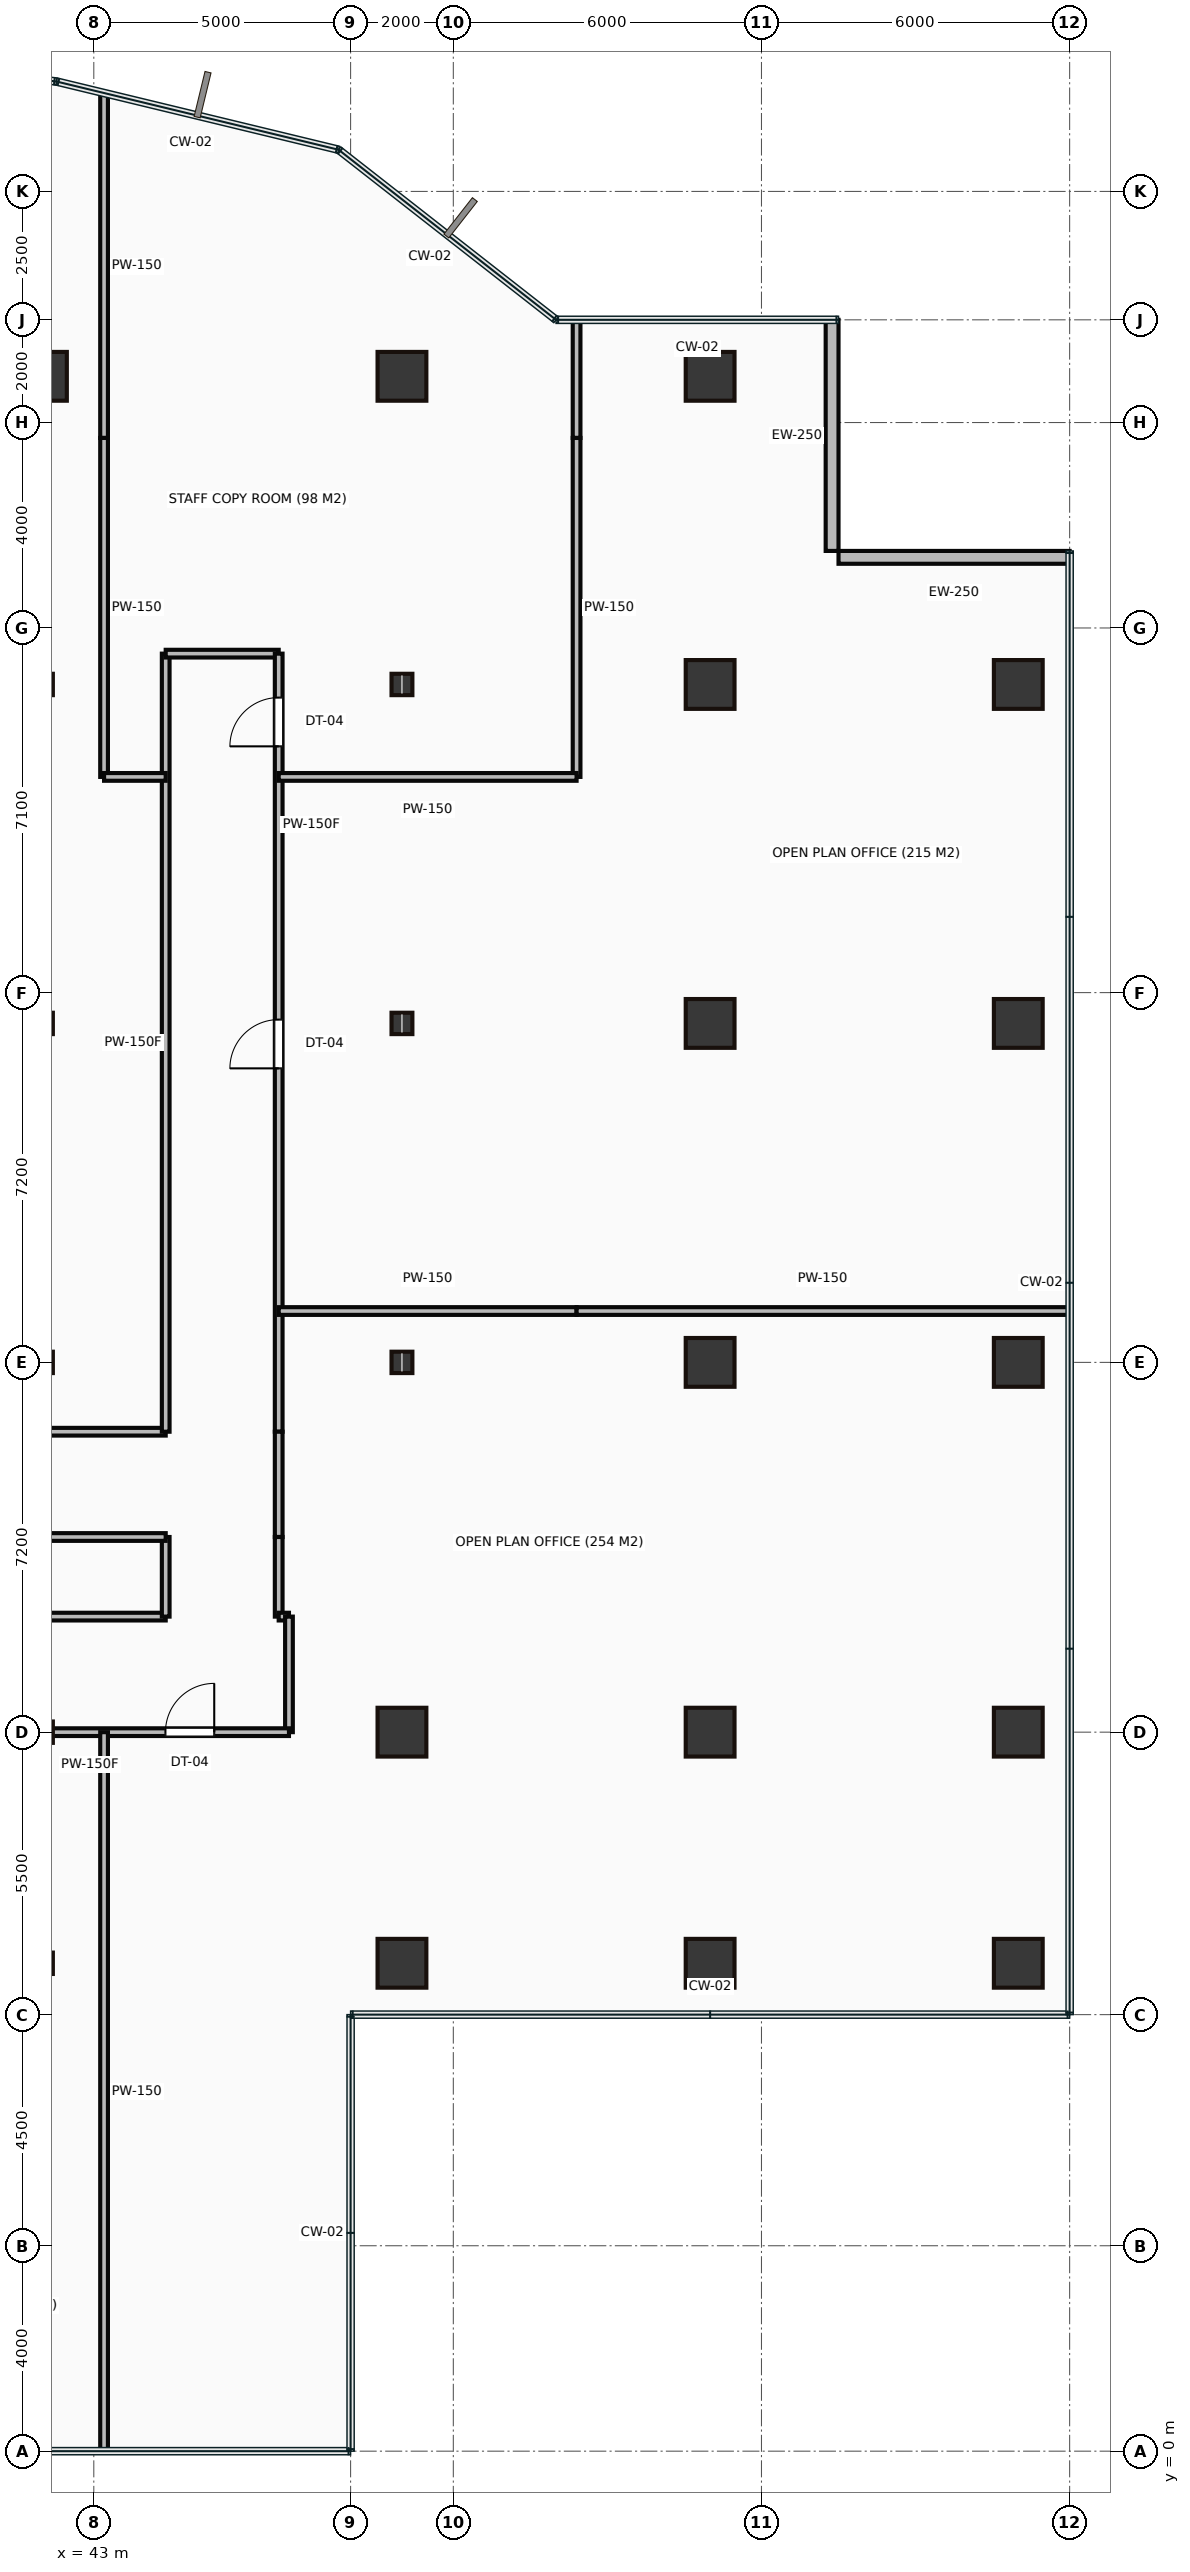
"""IFC4 building model, lengths in metres.
Left out: names, types, materials, properties, quantities, classifications, styles, units other than length and angle.
Written with IfcOpenShell. Run it as: python <this file> out.ifc"""

import sys

from ifc_helpers import new_model, si_unit, direction, frame, frame_2d, origin, origin_2d, place, context, subcontext, project, spatial, rectangle, hollow_rectangle, i_section, extrude, source, transform, mapped, element, fill, save


model = new_model("IFC4")
c1 = context("Model", 3, precision=1e-05, world=origin(), true_north=direction((0.0, 1.0)))
c2 = subcontext(c1, "Body", "Model", "MODEL_VIEW")
j1 = project(units=[si_unit("LENGTHUNIT", "METRE"), si_unit("PLANEANGLEUNIT", "RADIAN")], contexts=[c1])
p1 = place(None, origin())
s1 = spatial("IfcSite", under=j1, at=p1, CompositionType="ELEMENT")
p2 = place(p1, origin())
s2 = spatial("IfcBuilding", under=s1, at=p2, CompositionType="ELEMENT")
p3 = place(p2, frame((0.0, 0.0, 58.05)))
s3 = spatial("IfcBuildingStorey", under=s2, at=p3, CompositionType="ELEMENT", Elevation=58.05)
m1 = source(origin(), c2, "Body", "SweptSolid", [
    extrude(i_section(OverallWidth=0.406, OverallDepth=0.416, WebThickness=0.03, FlangeThickness=0.048, at=origin_2d()), origin(), (0.0, 0.0, 1.0), 3.65),
])
for number, where, z_axis, x_axis in (
    (1, (42.0, 9.5, 0.0), (0.0, 0.0, 1.0), (1.0, 0.0, 0.0)),
    (2, (42.0, 14.0, 0.0), (0.0, 0.0, 1.0), (1.0, 0.0, 0.0)),
    (3, (42.0, 21.2, 0.0), (0.0, 0.0, 1.0), (1.0, 0.0, 0.0)),
    (4, (42.0, 27.8, 0.0), (0.0, 0.0, 1.0), (1.0, 0.0, 0.0)),
    (5, (42.0, 34.4, 0.0), (0.0, 0.0, 1.0), (1.0, 0.0, 0.0)),
):
    element("IfcColumn", number, at=place(p3, frame(where, z_axis=z_axis, x_axis=x_axis)), inside=s3, PredefinedType="COLUMN", context=c2, shape_type="MappedRepresentation", body=[
        mapped(m1, transform((0.0, 0.0, 0.0))),
    ])
m2 = source(origin(), c2, "Body", "SweptSolid", [
    extrude(hollow_rectangle(XDim=0.95, YDim=0.95, WallThickness=0.045, at=origin_2d()), origin(), (0.0, 0.0, 1.0), 3.65),
])
for number, where, z_axis, x_axis in (
    (6, (42.0, 40.4, 0.0), (0.0, 0.0, 1.0), (1.0, 0.0, 0.0)),
    (7, (49.0, 9.5, 0.0), (0.0, 0.0, 1.0), (1.0, 0.0, 0.0)),
    (8, (49.0, 14.0, 0.0), (0.0, 0.0, 1.0), (1.0, 0.0, 0.0)),
):
    element("IfcColumn", number, at=place(p3, frame(where, z_axis=z_axis, x_axis=x_axis)), inside=s3, PredefinedType="COLUMN", context=c2, shape_type="MappedRepresentation", body=[
        mapped(m2, transform((0.0, 0.0, 0.0))),
    ])
for number, where, z_axis, x_axis in (
    (9, (49.0, 21.2, 0.0), (0.0, 0.0, 1.0), (1.0, 0.0, 0.0)),
    (10, (49.0, 27.8, 0.0), (0.0, 0.0, 1.0), (1.0, 0.0, 0.0)),
    (11, (49.0, 34.4, 0.0), (0.0, 0.0, 1.0), (1.0, 0.0, 0.0)),
):
    element("IfcColumn", number, at=place(p3, frame(where, z_axis=z_axis, x_axis=x_axis)), inside=s3, PredefinedType="COLUMN", context=c2, shape_type="MappedRepresentation", body=[
        mapped(m1, transform((0.0, 0.0, 0.0))),
    ])
for number, where, z_axis, x_axis in (
    (12, (49.0, 40.4, 0.0), (0.0, 0.0, 1.0), (1.0, 0.0, 0.0)),
    (13, (55.0, 9.5, 0.0), (0.0, 0.0, 1.0), (1.0, 0.0, 0.0)),
    (14, (55.0, 14.0, 0.0), (0.0, 0.0, 1.0), (1.0, 0.0, 0.0)),
    (15, (55.0, 21.2, 0.0), (0.0, 0.0, 1.0), (1.0, 0.0, 0.0)),
    (16, (55.0, 27.8, 0.0), (0.0, 0.0, 1.0), (1.0, 0.0, 0.0)),
    (17, (55.0, 34.4, 0.0), (0.0, 0.0, 1.0), (1.0, 0.0, 0.0)),
    (18, (55.0, 40.4, 0.0), (0.0, 0.0, 1.0), (1.0, 0.0, 0.0)),
    (19, (61.0, 9.5, 0.0), (0.0, 0.0, 1.0), (1.0, 0.0, 0.0)),
    (20, (61.0, 14.0, 0.0), (0.0, 0.0, 1.0), (1.0, 0.0, 0.0)),
    (21, (61.0, 21.2, 0.0), (0.0, 0.0, 1.0), (1.0, 0.0, 0.0)),
    (22, (61.0, 27.8, 0.0), (0.0, 0.0, 1.0), (1.0, 0.0, 0.0)),
    (23, (61.0, 34.4, 0.0), (0.0, 0.0, 1.0), (1.0, 0.0, 0.0)),
):
    element("IfcColumn", number, at=place(p3, frame(where, z_axis=z_axis, x_axis=x_axis)), inside=s3, PredefinedType="COLUMN", context=c2, shape_type="MappedRepresentation", body=[
        mapped(m2, transform((0.0, 0.0, 0.0))),
    ])
m3 = source(origin(), c2, "Body", "SweptSolid", [
    extrude(rectangle(XDim=4.5, YDim=0.25, at=frame_2d((2.25, 0.0))), origin(), (0.0, 0.0, 1.0), 3.4),
])
for number, where, z_axis, x_axis in (
    (24, (62.0, 36.875, 0.0), (0.0, 0.0, 1.0), (-1.0, 0.0, 0.0)),
    (25, (57.375, 37.0, 0.0), (0.0, 0.0, 1.0), (0.0, 1.0, 0.0)),
):
    element("IfcWall", number, at=place(p3, frame(where, z_axis=z_axis, x_axis=x_axis)), inside=s3, PredefinedType="STANDARD", context=c2, shape_type="MappedRepresentation", body=[
        mapped(m3, transform((0.0, 0.0, 0.0))),
    ])
m4 = source(origin(), c2, "Body", "SweptSolid", [
    extrude(rectangle(XDim=25.4, YDim=0.15, at=frame_2d((12.7, 0.0))), origin(), (0.0, 0.0, 1.0), 3.4),
])
p4 = place(p3, frame((19.0, 19.85, 0.0), z_axis=(0.0, 0.0, 1.0), x_axis=(1.0, 0.0, 0.0)))
e26 = element("IfcWall", 26, at=p4, inside=s3, PredefinedType="PARTITIONING", context=c2, shape_type="MappedRepresentation", body=[
    mapped(m4, transform((0.0, 0.0, 0.0))),
])
p5 = place(p4, frame((12.225, 0.0, 0.0)))
e27 = element("IfcOpeningElement", 27, at=p5, cuts=e26, PredefinedType="OPENING", context=c2, shape_type="SweptSolid", body=[
    extrude(rectangle(XDim=0.95, YDim=2.15, at=frame_2d((0.475, 1.075))), frame((0.0, 0.085, 0.0), z_axis=(0.0, -1.0, 0.0), x_axis=(1.0, 0.0, 0.0)), (0.0, 0.0, 1.0), 0.17),
])
m5 = source(origin(), c2, "Body", "SweptSolid", [
    extrude(rectangle(XDim=15.15, YDim=0.15, at=frame_2d((7.575, 0.0))), origin(), (0.0, 0.0, 1.0), 3.4),
])
p6 = place(p3, frame((44.4, 19.85, 0.0), z_axis=(0.0, 0.0, 1.0), x_axis=(0.0, 1.0, 0.0)))
e28 = element("IfcWall", 28, at=p6, inside=s3, PredefinedType="PARTITIONING", context=c2, shape_type="MappedRepresentation", body=[
    mapped(m5, transform((0.0, 0.0, 0.0))),
])
m6 = source(origin(), c2, "Body", "SweptSolid", [
    extrude(rectangle(XDim=2.2, YDim=0.15, at=frame_2d((1.1, 0.0))), origin(), (0.0, 0.0, 1.0), 3.4),
])
p7 = place(p3, frame((44.4, 35.0, 0.0), z_axis=(0.0, 0.0, 1.0), x_axis=(1.0, 0.0, 0.0)))
e29 = element("IfcWall", 29, at=p7, inside=s3, PredefinedType="PARTITIONING", context=c2, shape_type="MappedRepresentation", body=[
    mapped(m6, transform((0.0, 0.0, 0.0))),
])
p8 = place(p3, frame((46.6, 35.0, 0.0), z_axis=(0.0, 0.0, 1.0), x_axis=(0.0, -1.0, 0.0)))
e30 = element("IfcWall", 30, at=p8, inside=s3, PredefinedType="PARTITIONING", context=c2, shape_type="MappedRepresentation", body=[
    mapped(m5, transform((0.0, 0.0, 0.0))),
])
p9 = place(p8, frame((0.855, 0.0, 0.0)))
e31 = element("IfcOpeningElement", 31, at=p9, cuts=e30, PredefinedType="OPENING", context=c2, shape_type="SweptSolid", body=[
    extrude(rectangle(XDim=0.95, YDim=2.15, at=frame_2d((0.475, 1.075))), frame((0.0, 0.085, 0.0), z_axis=(0.0, -1.0, 0.0), x_axis=(1.0, 0.0, 0.0)), (0.0, 0.0, 1.0), 0.17),
])
p10 = place(p8, frame((7.125, 0.0, 0.0)))
e32 = element("IfcOpeningElement", 32, at=p10, cuts=e30, PredefinedType="OPENING", context=c2, shape_type="SweptSolid", body=[
    extrude(rectangle(XDim=0.95, YDim=2.15, at=frame_2d((0.475, 1.075))), frame((0.0, 0.085, 0.0), z_axis=(0.0, -1.0, 0.0), x_axis=(1.0, 0.0, 0.0)), (0.0, 0.0, 1.0), 0.17),
])
m7 = source(origin(), c2, "Body", "SweptSolid", [
    extrude(rectangle(XDim=2.05, YDim=0.15, at=frame_2d((1.025, 0.0))), origin(), (0.0, 0.0, 1.0), 3.4),
])
p11 = place(p3, frame((46.6, 19.85, 0.0), z_axis=(0.0, 0.0, 1.0), x_axis=(0.0, -1.0, 0.0)))
e33 = element("IfcWall", 33, at=p11, inside=s3, PredefinedType="PARTITIONING", context=c2, shape_type="MappedRepresentation", body=[
    mapped(m7, transform((0.0, 0.0, 0.0))),
])
m8 = source(origin(), c2, "Body", "SweptSolid", [
    extrude(rectangle(XDim=1.55, YDim=0.15, at=frame_2d((0.775, 0.0))), origin(), (0.0, 0.0, 1.0), 3.4),
])
p12 = place(p3, frame((46.6, 17.8, 0.0), z_axis=(0.0, 0.0, 1.0), x_axis=(0.0, -1.0, 0.0)))
e34 = element("IfcWall", 34, at=p12, inside=s3, PredefinedType="PARTITIONING", context=c2, shape_type="MappedRepresentation", body=[
    mapped(m8, transform((0.0, 0.0, 0.0))),
])
m9 = source(origin(), c2, "Body", "SweptSolid", [
    extrude(rectangle(XDim=0.2, YDim=0.15, at=frame_2d((0.1, 0.0))), origin(), (0.0, 0.0, 1.0), 3.4),
])
p13 = place(p3, frame((46.6, 16.25, 0.0), z_axis=(0.0, 0.0, 1.0), x_axis=(1.0, 0.0, 0.0)))
e35 = element("IfcWall", 35, at=p13, inside=s3, PredefinedType="PARTITIONING", context=c2, shape_type="MappedRepresentation", body=[
    mapped(m9, transform((0.0, 0.0, 0.0))),
])
m10 = source(origin(), c2, "Body", "SweptSolid", [
    extrude(rectangle(XDim=2.25, YDim=0.15, at=frame_2d((1.125, 0.0))), origin(), (0.0, 0.0, 1.0), 3.4),
])
p14 = place(p3, frame((46.8, 16.25, 0.0), z_axis=(0.0, 0.0, 1.0), x_axis=(0.0, -1.0, 0.0)))
e36 = element("IfcWall", 36, at=p14, inside=s3, PredefinedType="PARTITIONING", context=c2, shape_type="MappedRepresentation", body=[
    mapped(m10, transform((0.0, 0.0, 0.0))),
])
m11 = source(origin(), c2, "Body", "SweptSolid", [
    extrude(rectangle(XDim=7.75, YDim=0.15, at=frame_2d((3.875, 0.0))), origin(), (0.0, 0.0, 1.0), 2.625),
])
p15 = place(p3, frame((46.8, 14.0, 0.0), z_axis=(0.0, 0.0, 1.0), x_axis=(-1.0, 0.0, 0.0)))
e37 = element("IfcWall", 37, at=p15, inside=s3, PredefinedType="PARTITIONING", context=c2, shape_type="MappedRepresentation", body=[
    mapped(m11, transform((0.0, 0.0, 0.0))),
])
p16 = place(p15, frame((5.96, 0.0, 0.0)))
e38 = element("IfcOpeningElement", 38, at=p16, cuts=e37, PredefinedType="OPENING", context=c2, shape_type="SweptSolid", body=[
    extrude(rectangle(XDim=0.95, YDim=2.15, at=frame_2d((0.475, 1.075))), frame((0.0, 0.085, 0.0), z_axis=(0.0, -1.0, 0.0), x_axis=(1.0, 0.0, 0.0)), (0.0, 0.0, 1.0), 0.17),
])
p17 = place(p15, frame((1.455, 0.0, 0.0)))
e39 = element("IfcOpeningElement", 39, at=p17, cuts=e37, PredefinedType="OPENING", context=c2, shape_type="SweptSolid", body=[
    extrude(rectangle(XDim=0.95, YDim=2.15, at=frame_2d((0.475, 1.075))), frame((0.0, 0.085, 0.0), z_axis=(0.0, -1.0, 0.0), x_axis=(1.0, 0.0, 0.0)), (0.0, 0.0, 1.0), 0.17),
])
p18 = place(p3, frame((19.0, 16.25, 0.0), z_axis=(0.0, 0.0, 1.0), x_axis=(1.0, 0.0, 0.0)))
e40 = element("IfcWall", 40, at=p18, inside=s3, PredefinedType="PARTITIONING", context=c2, shape_type="MappedRepresentation", body=[
    mapped(m4, transform((0.0, 0.0, 0.0))),
])
p19 = place(p18, frame((12.225, 0.0, 0.0)))
e41 = element("IfcOpeningElement", 41, at=p19, cuts=e40, PredefinedType="OPENING", context=c2, shape_type="SweptSolid", body=[
    extrude(rectangle(XDim=0.95, YDim=2.15, at=frame_2d((0.475, 1.075))), frame((0.0, 0.085, 0.0), z_axis=(0.0, -1.0, 0.0), x_axis=(1.0, 0.0, 0.0)), (0.0, 0.0, 1.0), 0.17),
])
p20 = place(p3, frame((44.4, 16.25, 0.0), z_axis=(0.0, 0.0, 1.0), x_axis=(0.0, 1.0, 0.0)))
e42 = element("IfcWall", 42, at=p20, inside=s3, PredefinedType="PARTITIONING", context=c2, shape_type="MappedRepresentation", body=[
    mapped(m8, transform((0.0, 0.0, 0.0))),
])
p21 = place(p3, frame((44.4, 17.8, 0.0), z_axis=(0.0, 0.0, 1.0), x_axis=(-1.0, 0.0, 0.0)))
e43 = element("IfcWall", 43, at=p21, inside=s3, PredefinedType="PARTITIONING", context=c2, shape_type="MappedRepresentation", body=[
    mapped(m4, transform((0.0, 0.0, 0.0))),
])
m12 = source(origin(), c2, "Body", "SweptSolid", [
    extrude(rectangle(XDim=13.98, YDim=0.15, at=frame_2d((6.99, 0.0))), origin(), (0.0, 0.0, 1.0), 3.4),
])
p22 = place(p3, frame((43.2, 14.0, 0.0), z_axis=(0.0, 0.0, 1.0), x_axis=(0.0, -1.0, 0.0)))
e44 = element("IfcWall", 44, at=p22, inside=s3, PredefinedType="PARTITIONING", context=c2, shape_type="MappedRepresentation", body=[
    mapped(m12, transform((0.0, 0.0, 0.0))),
])
m13 = source(origin(), c2, "Body", "SweptSolid", [
    extrude(rectangle(XDim=6.696, YDim=0.15, at=frame_2d((3.348, 0.0))), origin(), (0.0, 0.0, 1.0), 3.4),
])
p23 = place(p3, frame((43.2, 45.896, 0.0), z_axis=(0.0, 0.0, 1.0), x_axis=(0.0, -1.0, 0.0)))
e45 = element("IfcWall", 45, at=p23, inside=s3, PredefinedType="PARTITIONING", context=c2, shape_type="MappedRepresentation", body=[
    mapped(m13, transform((0.0, 0.0, 0.0))),
])
m14 = source(origin(), c2, "Body", "SweptSolid", [
    extrude(rectangle(XDim=6.6, YDim=0.15, at=frame_2d((3.3, 0.0))), origin(), (0.0, 0.0, 1.0), 3.4),
])
p24 = place(p3, frame((43.2, 39.2, 0.0), z_axis=(0.0, 0.0, 1.0), x_axis=(0.0, -1.0, 0.0)))
e46 = element("IfcWall", 46, at=p24, inside=s3, PredefinedType="PARTITIONING", context=c2, shape_type="MappedRepresentation", body=[
    mapped(m14, transform((0.0, 0.0, 0.0))),
])
m15 = source(origin(), c2, "Body", "SweptSolid", [
    extrude(rectangle(XDim=1.2, YDim=0.15, at=frame_2d((0.6, 0.0))), origin(), (0.0, 0.0, 1.0), 3.4),
])
p25 = place(p3, frame((43.2, 32.6, 0.0), z_axis=(0.0, 0.0, 1.0), x_axis=(1.0, 0.0, 0.0)))
e47 = element("IfcWall", 47, at=p25, inside=s3, PredefinedType="PARTITIONING", context=c2, shape_type="MappedRepresentation", body=[
    mapped(m15, transform((0.0, 0.0, 0.0))),
])
m16 = source(origin(), c2, "Body", "SweptSolid", [
    extrude(rectangle(XDim=5.8, YDim=0.15, at=frame_2d((2.9, 0.0))), origin(), (0.0, 0.0, 1.0), 3.4),
])
p26 = place(p3, frame((46.6, 22.2, 0.0), z_axis=(0.0, 0.0, 1.0), x_axis=(1.0, 0.0, 0.0)))
e48 = element("IfcWall", 48, at=p26, inside=s3, PredefinedType="PARTITIONING", context=c2, shape_type="MappedRepresentation", body=[
    mapped(m16, transform((0.0, 0.0, 0.0))),
])
m17 = source(origin(), c2, "Body", "SweptSolid", [
    extrude(rectangle(XDim=9.58, YDim=0.15, at=frame_2d((4.79, 0.0))), origin(), (0.0, 0.0, 1.0), 3.4),
])
p27 = place(p3, frame((52.4, 22.2, 0.0), z_axis=(0.0, 0.0, 1.0), x_axis=(1.0, 0.0, 0.0)))
e49 = element("IfcWall", 49, at=p27, inside=s3, PredefinedType="PARTITIONING", context=c2, shape_type="MappedRepresentation", body=[
    mapped(m17, transform((0.0, 0.0, 0.0))),
])
m18 = source(origin(), c2, "Body", "SweptSolid", [
    extrude(rectangle(XDim=2.28, YDim=0.15, at=frame_2d((1.14, 0.0))), origin(), (0.0, 0.0, 1.0), 3.4),
])
p28 = place(p3, frame((52.4, 41.48, 0.0), z_axis=(0.0, 0.0, 1.0), x_axis=(0.0, -1.0, 0.0)))
e50 = element("IfcWall", 50, at=p28, inside=s3, PredefinedType="PARTITIONING", context=c2, shape_type="MappedRepresentation", body=[
    mapped(m18, transform((0.0, 0.0, 0.0))),
])
p29 = place(p3, frame((52.4, 39.2, 0.0), z_axis=(0.0, 0.0, 1.0), x_axis=(0.0, -1.0, 0.0)))
e51 = element("IfcWall", 51, at=p29, inside=s3, PredefinedType="PARTITIONING", context=c2, shape_type="MappedRepresentation", body=[
    mapped(m14, transform((0.0, 0.0, 0.0))),
])
p30 = place(p3, frame((52.4, 32.6, 0.0), z_axis=(0.0, 0.0, 1.0), x_axis=(-1.0, 0.0, 0.0)))
e52 = element("IfcWall", 52, at=p30, inside=s3, PredefinedType="PARTITIONING", context=c2, shape_type="MappedRepresentation", body=[
    mapped(m16, transform((0.0, 0.0, 0.0))),
])
m19 = source(origin(), c2, "Body", "SweptSolid", [
    extrude(rectangle(XDim=0.95, YDim=2.15, at=frame_2d((0.475, 1.075))), frame((0.0, 0.025, 0.0), z_axis=(0.0, -1.0, 0.0), x_axis=(1.0, 0.0, 0.0)), (0.0, 0.0, 1.0), 0.05),
])
p31 = place(p9, origin())
e53 = element("IfcDoor", 53, at=p31, inside=s3, OperationType="SINGLE_SWING_RIGHT", PredefinedType="DOOR", context=c2, shape_type="MappedRepresentation", body=[
    mapped(m19, transform((0.0, 0.0, 0.0))),
])
fill(e31, e53)
p32 = place(p17, origin())
e54 = element("IfcDoor", 54, at=p32, inside=s3, OperationType="SINGLE_SWING_LEFT", PredefinedType="DOOR", context=c2, shape_type="MappedRepresentation", body=[
    mapped(m19, transform((0.0, 0.0, 0.0))),
])
fill(e39, e54)
p33 = place(p10, origin())
e55 = element("IfcDoor", 55, at=p33, inside=s3, OperationType="SINGLE_SWING_RIGHT", PredefinedType="DOOR", context=c2, shape_type="MappedRepresentation", body=[
    mapped(m19, transform((0.0, 0.0, 0.0))),
])
fill(e32, e55)
save(model, sys.argv[1])
